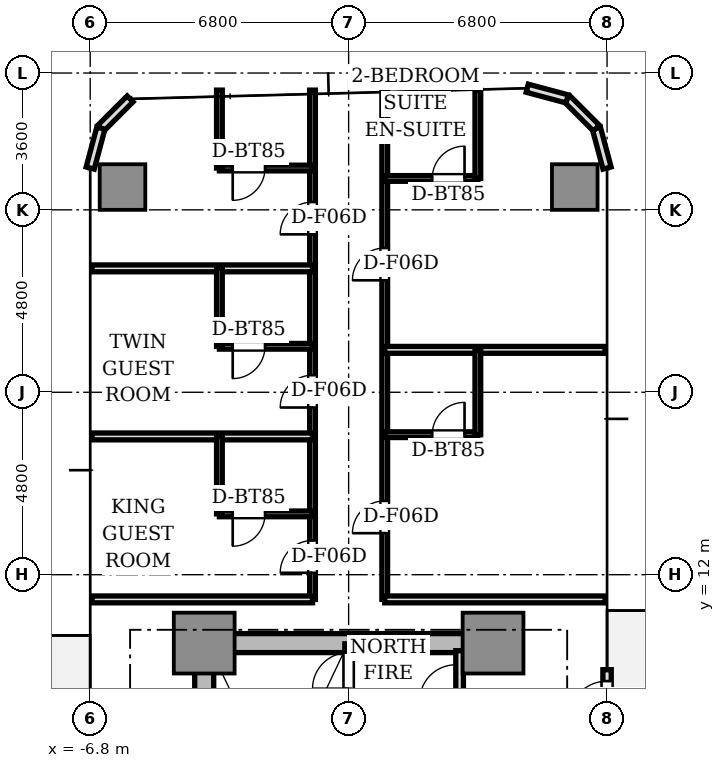
"""IFC4 building model, lengths in metres.
Left out: names, types, materials, properties, quantities, classifications, styles, units other than length and angle.
Written with IfcOpenShell. Run it as: python <this file> out.ifc"""

import sys

from ifc_helpers import new_model, si_unit, direction, frame, frame_2d, origin, origin_2d, place, context, subcontext, project, spatial, rectangle, extrude, source, transform, mapped, element, fill, save


model = new_model("IFC4")
c1 = context("Model", 3, precision=1e-05, world=origin(), true_north=direction((0.0, 1.0)))
c2 = subcontext(c1, "Body", "Model", "MODEL_VIEW")
j1 = project(units=[si_unit("LENGTHUNIT", "METRE"), si_unit("PLANEANGLEUNIT", "RADIAN")], contexts=[c1])
p1 = place(None, origin())
s1 = spatial("IfcSite", under=j1, at=p1, CompositionType="ELEMENT")
p2 = place(p1, origin())
s2 = spatial("IfcBuilding", under=s1, at=p2, CompositionType="ELEMENT")
p3 = place(p2, frame((0.0, 0.0, 36.5)))
s3 = spatial("IfcBuildingStorey", under=s2, at=p3, CompositionType="ELEMENT", Elevation=36.5)
p4 = place(p3, frame((-3.55, 10.2, 0.0), z_axis=(0.0, 0.0, 1.0), x_axis=(1.0, 0.0, 0.0)))
e1 = element("IfcWall", 1, at=p4, inside=s3, PredefinedType="SHEAR", context=c2, shape_type="SweptSolid", body=[
    extrude(rectangle(XDim=7.1, YDim=0.5, at=frame_2d((3.55, 0.0))), origin(), (0.0, 0.0, 1.0), 3.11),
])
p5 = place(p3, frame((-3.8, 2.85, 0.0), z_axis=(0.0, 0.0, 1.0), x_axis=(0.0, 1.0, 0.0)))
e2 = element("IfcWall", 2, at=p5, inside=s3, PredefinedType="SHEAR", context=c2, shape_type="SweptSolid", body=[
    extrude(rectangle(XDim=6.9, YDim=0.5, at=frame_2d((3.45, 0.0))), origin(), (0.0, 0.0, 1.0), 3.11),
])
m1 = source(origin(), c2, "Body", "SweptSolid", [
    extrude(rectangle(XDim=1.6, YDim=1.6, at=origin_2d()), origin(), (0.0, 0.0, 1.0), 3.11),
])
for number, where, z_axis, x_axis in (
    (3, (-3.8, 10.2, 0.0), (0.0, 0.0, 1.0), (1.0, 0.0, 0.0)),
    (4, (3.8, 10.2, 0.0), (0.0, 0.0, 1.0), (1.0, 0.0, 0.0)),
):
    element("IfcColumn", number, at=place(p3, frame(where, z_axis=z_axis, x_axis=x_axis)), inside=s3, PredefinedType="COLUMN", context=c2, shape_type="MappedRepresentation", body=[
        mapped(m1, transform((0.0, 0.0, 0.0), scale=1.0)),
    ])
m2 = source(origin(), c2, "Body", "SweptSolid", [
    extrude(rectangle(XDim=1.2, YDim=1.2, at=origin_2d()), origin(), (0.0, 0.0, 1.0), 3.11),
])
for number, where, z_axis, x_axis in (
    (5, (5.95, 22.2, 0.0), (0.0, 0.0, 1.0), (1.0, 0.0, 0.0)),
    (6, (-5.95, 22.2, 0.0), (0.0, 0.0, 1.0), (1.0, 0.0, 0.0)),
):
    element("IfcColumn", number, at=place(p3, frame(where, z_axis=z_axis, x_axis=x_axis)), inside=s3, PredefinedType="COLUMN", context=c2, shape_type="MappedRepresentation", body=[
        mapped(m2, transform((0.0, 0.0, 0.0), scale=1.0)),
    ])
p6 = place(p3, frame((6.8, 6.8, 0.0), z_axis=(0.0, 0.0, 1.0), x_axis=(0.0, 1.0, 0.0)))
e7 = element("IfcWall", 7, at=p6, inside=s3, PredefinedType="STANDARD", context=c2, shape_type="SweptSolid", body=[
    extrude(rectangle(XDim=2.7, YDim=0.22, at=frame_2d((1.35, 0.0))), origin(), (0.0, 0.0, 1.0), 3.11),
])
p7 = place(p6, frame((1.4, 0.0, 0.0)))
e8 = element("IfcOpeningElement", 8, at=p7, cuts=e7, PredefinedType="OPENING", context=c2, shape_type="SweptSolid", body=[
    extrude(rectangle(XDim=1.0, YDim=2.2, at=frame_2d((0.5, 1.1))), frame((0.0, 0.12, 0.0), z_axis=(0.0, -1.0, 0.0), x_axis=(1.0, 0.0, 0.0)), (0.0, 0.0, 1.0), 0.24),
])
for number, where, z_axis, x_axis in (
    (9, (6.8, 22.7, 0.0), (0.0, 0.0, 1.0), (-0.259, 0.966, 0.0)),
    (10, (6.519, 23.75, 0.0), (0.0, 0.0, 1.0), (-0.707, 0.707, 0.0)),
    (11, (5.75, 24.519, 0.0), (0.0, 0.0, 1.0), (-0.966, 0.259, 0.0)),
    (12, (-5.75, 24.519, 0.0), (0.0, 0.0, 1.0), (-0.707, -0.707, 0.0)),
    (13, (-6.519, 23.75, 0.0), (0.0, 0.0, 1.0), (-0.259, -0.966, 0.0)),
):
    element("IfcWall", number, at=place(p3, frame(where, z_axis=z_axis, x_axis=x_axis)), inside=s3, PredefinedType="STANDARD", context=c2, shape_type="SweptSolid", body=[
        extrude(rectangle(XDim=1.087, YDim=0.22, at=frame_2d((0.543, 0.0))), origin(), (0.0, 0.0, 1.0), 3.11),
    ])
p8 = place(p3, frame((0.0, 2.5, 0.0), z_axis=(0.0, 0.0, 1.0), x_axis=(0.0, 1.0, 0.0)))
e14 = element("IfcWall", 14, at=p8, inside=s3, PredefinedType="SOLIDWALL", context=c2, shape_type="SweptSolid", body=[
    extrude(rectangle(XDim=7.68, YDim=0.2, at=frame_2d((3.84, 0.0))), origin(), (0.0, 0.0, 1.0), 3.11),
])
p9 = place(p8, frame((6.5, 0.0, 0.0)))
e15 = element("IfcOpeningElement", 15, at=p9, cuts=e14, PredefinedType="OPENING", context=c2, shape_type="SweptSolid", body=[
    extrude(rectangle(XDim=0.95, YDim=2.15, at=frame_2d((0.475, 1.075))), frame((0.0, 0.11, 0.0), z_axis=(0.0, -1.0, 0.0), x_axis=(1.0, 0.0, 0.0)), (0.0, 0.0, 1.0), 0.22),
])
p10 = place(p3, frame((2.92, 8.68, 0.0), z_axis=(0.0, 0.0, 1.0), x_axis=(0.0, 1.0, 0.0)))
e16 = element("IfcWall", 16, at=p10, inside=s3, PredefinedType="SOLIDWALL", context=c2, shape_type="SweptSolid", body=[
    extrude(rectangle(XDim=1.32, YDim=0.2, at=frame_2d((0.66, 0.0))), origin(), (0.0, 0.0, 1.0), 2.66),
])
p11 = place(p3, frame((-0.95, 11.35, 0.0), z_axis=(0.0, 0.0, 1.0), x_axis=(0.0, 1.0, 0.0)))
e17 = element("IfcWall", 17, at=p11, inside=s3, PredefinedType="PARTITIONING", context=c2, shape_type="SweptSolid", body=[
    extrude(rectangle(XDim=13.4, YDim=0.15, at=frame_2d((6.7, 0.0))), origin(), (0.0, 0.0, 1.0), 2.66),
])
p12 = place(p11, frame((0.7, 0.0, 0.0)))
e18 = element("IfcOpeningElement", 18, at=p12, cuts=e17, PredefinedType="OPENING", context=c2, shape_type="SweptSolid", body=[
    extrude(rectangle(XDim=0.85, YDim=2.1, at=frame_2d((0.425, 1.05))), frame((0.0, 0.085, 0.0), z_axis=(0.0, -1.0, 0.0), x_axis=(1.0, 0.0, 0.0)), (0.0, 0.0, 1.0), 0.17),
])
p13 = place(p11, frame((5.049, 0.0, 0.0)))
e19 = element("IfcOpeningElement", 19, at=p13, cuts=e17, PredefinedType="OPENING", context=c2, shape_type="SweptSolid", body=[
    extrude(rectangle(XDim=0.85, YDim=2.1, at=frame_2d((0.425, 1.05))), frame((0.0, 0.085, 0.0), z_axis=(0.0, -1.0, 0.0), x_axis=(1.0, 0.0, 0.0)), (0.0, 0.0, 1.0), 0.17),
])
p14 = place(p11, frame((9.605, 0.0, 0.0)))
e20 = element("IfcOpeningElement", 20, at=p14, cuts=e17, PredefinedType="OPENING", context=c2, shape_type="SweptSolid", body=[
    extrude(rectangle(XDim=0.85, YDim=2.1, at=frame_2d((0.425, 1.05))), frame((0.0, 0.085, 0.0), z_axis=(0.0, -1.0, 0.0), x_axis=(1.0, 0.0, 0.0)), (0.0, 0.0, 1.0), 0.17),
])
p15 = place(p3, frame((0.95, 11.35, 0.0), z_axis=(0.0, 0.0, 1.0), x_axis=(0.0, 1.0, 0.0)))
e21 = element("IfcWall", 21, at=p15, inside=s3, PredefinedType="PARTITIONING", context=c2, shape_type="SweptSolid", body=[
    extrude(rectangle(XDim=13.4, YDim=0.15, at=frame_2d((6.7, 0.0))), origin(), (0.0, 0.0, 1.0), 2.66),
])
p16 = place(p15, frame((1.742, 0.0, 0.0)))
e22 = element("IfcOpeningElement", 22, at=p16, cuts=e21, PredefinedType="OPENING", context=c2, shape_type="SweptSolid", body=[
    extrude(rectangle(XDim=0.85, YDim=2.1, at=frame_2d((0.425, 1.05))), frame((0.0, 0.085, 0.0), z_axis=(0.0, -1.0, 0.0), x_axis=(1.0, 0.0, 0.0)), (0.0, 0.0, 1.0), 0.17),
])
p17 = place(p15, frame((8.396, 0.0, 0.0)))
e23 = element("IfcOpeningElement", 23, at=p17, cuts=e21, PredefinedType="OPENING", context=c2, shape_type="SweptSolid", body=[
    extrude(rectangle(XDim=0.85, YDim=2.1, at=frame_2d((0.425, 1.05))), frame((0.0, 0.085, 0.0), z_axis=(0.0, -1.0, 0.0), x_axis=(1.0, 0.0, 0.0)), (0.0, 0.0, 1.0), 0.17),
])
for number, where, z_axis, x_axis in (
    (24, (-0.95, 11.35, 0.0), (0.0, 0.0, 1.0), (-1.0, 0.0, 0.0)),
    (25, (6.75, 11.35, 0.0), (0.0, 0.0, 1.0), (-1.0, 0.0, 0.0)),
    (26, (-0.95, 15.638, 0.0), (0.0, 0.0, 1.0), (-1.0, 0.0, 0.0)),
):
    element("IfcWall", number, at=place(p3, frame(where, z_axis=z_axis, x_axis=x_axis)), inside=s3, PredefinedType="PARTITIONING", context=c2, shape_type="SweptSolid", body=[
        extrude(rectangle(XDim=5.8, YDim=0.18, at=frame_2d((2.9, 0.0))), origin(), (0.0, 0.0, 1.0), 2.66),
    ])
p18 = place(p3, frame((-0.95, 13.6, 0.0), z_axis=(0.0, 0.0, 1.0), x_axis=(-1.0, 0.0, 0.0)))
e27 = element("IfcWall", 27, at=p18, inside=s3, PredefinedType="PARTITIONING", context=c2, shape_type="SweptSolid", body=[
    extrude(rectangle(XDim=2.45, YDim=0.15, at=frame_2d((1.225, 0.0))), origin(), (0.0, 0.0, 1.0), 2.66),
])
p19 = place(p18, frame((1.25, 0.0, 0.0)))
e28 = element("IfcOpeningElement", 28, at=p19, cuts=e27, PredefinedType="OPENING", context=c2, shape_type="SweptSolid", body=[
    extrude(rectangle(XDim=0.85, YDim=2.1, at=frame_2d((0.425, 1.05))), frame((0.0, 0.085, 0.0), z_axis=(0.0, -1.0, 0.0), x_axis=(1.0, 0.0, 0.0)), (0.0, 0.0, 1.0), 0.17),
])
p20 = place(p3, frame((-3.4, 13.6, 0.0), z_axis=(0.0, 0.0, 1.0), x_axis=(0.0, 1.0, 0.0)))
e29 = element("IfcWall", 29, at=p20, inside=s3, PredefinedType="PARTITIONING", context=c2, shape_type="SweptSolid", body=[
    extrude(rectangle(XDim=2.038, YDim=0.15, at=frame_2d((1.019, 0.0))), origin(), (0.0, 0.0, 1.0), 2.66),
])
p21 = place(p3, frame((-0.95, 20.06, 0.0), z_axis=(0.0, 0.0, 1.0), x_axis=(-1.0, 0.0, 0.0)))
e30 = element("IfcWall", 30, at=p21, inside=s3, PredefinedType="PARTITIONING", context=c2, shape_type="SweptSolid", body=[
    extrude(rectangle(XDim=5.8, YDim=0.18, at=frame_2d((2.9, 0.0))), origin(), (0.0, 0.0, 1.0), 2.66),
])
p22 = place(p3, frame((-0.95, 18.01, 0.0), z_axis=(0.0, 0.0, 1.0), x_axis=(-1.0, 0.0, 0.0)))
e31 = element("IfcWall", 31, at=p22, inside=s3, PredefinedType="PARTITIONING", context=c2, shape_type="SweptSolid", body=[
    extrude(rectangle(XDim=2.45, YDim=0.15, at=frame_2d((1.225, 0.0))), origin(), (0.0, 0.0, 1.0), 2.66),
])
p23 = place(p22, frame((1.25, 0.0, 0.0)))
e32 = element("IfcOpeningElement", 32, at=p23, cuts=e31, PredefinedType="OPENING", context=c2, shape_type="SweptSolid", body=[
    extrude(rectangle(XDim=0.85, YDim=2.1, at=frame_2d((0.425, 1.05))), frame((0.0, 0.085, 0.0), z_axis=(0.0, -1.0, 0.0), x_axis=(1.0, 0.0, 0.0)), (0.0, 0.0, 1.0), 0.17),
])
p24 = place(p3, frame((-3.4, 18.01, 0.0), z_axis=(0.0, 0.0, 1.0), x_axis=(0.0, 1.0, 0.0)))
e33 = element("IfcWall", 33, at=p24, inside=s3, PredefinedType="PARTITIONING", context=c2, shape_type="SweptSolid", body=[
    extrude(rectangle(XDim=2.05, YDim=0.15, at=frame_2d((1.025, 0.0))), origin(), (0.0, 0.0, 1.0), 2.66),
])
p25 = place(p3, frame((-0.95, 22.7, 0.0), z_axis=(0.0, 0.0, 1.0), x_axis=(-1.0, 0.0, 0.0)))
e34 = element("IfcWall", 34, at=p25, inside=s3, PredefinedType="PARTITIONING", context=c2, shape_type="SweptSolid", body=[
    extrude(rectangle(XDim=2.45, YDim=0.15, at=frame_2d((1.225, 0.0))), origin(), (0.0, 0.0, 1.0), 2.66),
])
p26 = place(p25, frame((1.25, 0.0, 0.0)))
e35 = element("IfcOpeningElement", 35, at=p26, cuts=e34, PredefinedType="OPENING", context=c2, shape_type="SweptSolid", body=[
    extrude(rectangle(XDim=0.85, YDim=2.1, at=frame_2d((0.425, 1.05))), frame((0.0, 0.085, 0.0), z_axis=(0.0, -1.0, 0.0), x_axis=(1.0, 0.0, 0.0)), (0.0, 0.0, 1.0), 0.17),
])
p27 = place(p3, frame((-3.4, 22.7, 0.0), z_axis=(0.0, 0.0, 1.0), x_axis=(0.0, 1.0, 0.0)))
e36 = element("IfcWall", 36, at=p27, inside=s3, PredefinedType="PARTITIONING", context=c2, shape_type="SweptSolid", body=[
    extrude(rectangle(XDim=2.05, YDim=0.15, at=frame_2d((1.025, 0.0))), origin(), (0.0, 0.0, 1.0), 2.66),
])
p28 = place(p3, frame((0.95, 17.916, 0.0), z_axis=(0.0, 0.0, 1.0), x_axis=(1.0, 0.0, 0.0)))
e37 = element("IfcWall", 37, at=p28, inside=s3, PredefinedType="PARTITIONING", context=c2, shape_type="SweptSolid", body=[
    extrude(rectangle(XDim=5.8, YDim=0.18, at=frame_2d((2.9, 0.0))), origin(), (0.0, 0.0, 1.0), 2.66),
])
p29 = place(p3, frame((0.95, 15.684, 0.0), z_axis=(0.0, 0.0, 1.0), x_axis=(1.0, 0.0, 0.0)))
e38 = element("IfcWall", 38, at=p29, inside=s3, PredefinedType="PARTITIONING", context=c2, shape_type="SweptSolid", body=[
    extrude(rectangle(XDim=2.45, YDim=0.15, at=frame_2d((1.225, 0.0))), origin(), (0.0, 0.0, 1.0), 2.66),
])
p30 = place(p29, frame((1.25, 0.0, 0.0)))
e39 = element("IfcOpeningElement", 39, at=p30, cuts=e38, PredefinedType="OPENING", context=c2, shape_type="SweptSolid", body=[
    extrude(rectangle(XDim=0.85, YDim=2.1, at=frame_2d((0.425, 1.05))), frame((0.0, 0.085, 0.0), z_axis=(0.0, -1.0, 0.0), x_axis=(1.0, 0.0, 0.0)), (0.0, 0.0, 1.0), 0.17),
])
p31 = place(p3, frame((3.4, 15.684, 0.0), z_axis=(0.0, 0.0, 1.0), x_axis=(0.0, 1.0, 0.0)))
e40 = element("IfcWall", 40, at=p31, inside=s3, PredefinedType="PARTITIONING", context=c2, shape_type="SweptSolid", body=[
    extrude(rectangle(XDim=2.232, YDim=0.15, at=frame_2d((1.116, 0.0))), origin(), (0.0, 0.0, 1.0), 2.66),
])
p32 = place(p3, frame((0.95, 22.426, 0.0), z_axis=(0.0, 0.0, 1.0), x_axis=(1.0, 0.0, 0.0)))
e41 = element("IfcWall", 41, at=p32, inside=s3, PredefinedType="PARTITIONING", context=c2, shape_type="SweptSolid", body=[
    extrude(rectangle(XDim=2.45, YDim=0.15, at=frame_2d((1.225, 0.0))), origin(), (0.0, 0.0, 1.0), 2.58),
])
p33 = place(p32, frame((1.25, 0.0, 0.0)))
e42 = element("IfcOpeningElement", 42, at=p33, cuts=e41, PredefinedType="OPENING", context=c2, shape_type="SweptSolid", body=[
    extrude(rectangle(XDim=0.85, YDim=2.1, at=frame_2d((0.425, 1.05))), frame((0.0, 0.085, 0.0), z_axis=(0.0, -1.0, 0.0), x_axis=(1.0, 0.0, 0.0)), (0.0, 0.0, 1.0), 0.17),
])
p34 = place(p3, frame((3.4, 22.426, 0.0), z_axis=(0.0, 0.0, 1.0), x_axis=(0.0, 1.0, 0.0)))
e43 = element("IfcWall", 43, at=p34, inside=s3, PredefinedType="PARTITIONING", context=c2, shape_type="SweptSolid", body=[
    extrude(rectangle(XDim=2.324, YDim=0.15, at=frame_2d((1.162, 0.0))), origin(), (0.0, 0.0, 1.0), 2.66),
])
m3 = source(origin(), c2, "Body", "SweptSolid", [
    extrude(rectangle(XDim=1.0, YDim=0.05, at=origin_2d()), origin(), (0.0, 0.0, 1.0), 2.2),
])
p35 = place(p7, frame((0.5, 0.0, 0.0)))
e44 = element("IfcDoor", 44, at=p35, inside=s3, OperationType="SINGLE_SWING_LEFT", PredefinedType="DOOR", context=c2, shape_type="MappedRepresentation", body=[
    mapped(m3, transform((0.0, 0.0, 0.0), scale=1.0)),
])
fill(e8, e44)
m4 = source(origin(), c2, "Body", "SweptSolid", [
    extrude(rectangle(XDim=0.95, YDim=0.05, at=origin_2d()), origin(), (0.0, 0.0, 1.0), 2.15),
])
p36 = place(p9, frame((0.475, 0.0, 0.0)))
e45 = element("IfcDoor", 45, at=p36, inside=s3, OperationType="SINGLE_SWING_LEFT", PredefinedType="DOOR", context=c2, shape_type="MappedRepresentation", body=[
    mapped(m4, transform((0.0, 0.0, 0.0), scale=1.0)),
])
fill(e15, e45)
m5 = source(origin(), c2, "Body", "SweptSolid", [
    extrude(rectangle(XDim=0.85, YDim=0.05, at=origin_2d()), origin(), (0.0, 0.0, 1.0), 2.1),
])
p37 = place(p19, frame((0.425, 0.0, 0.0)))
e46 = element("IfcDoor", 46, at=p37, inside=s3, OperationType="SINGLE_SWING_RIGHT", PredefinedType="DOOR", context=c2, shape_type="MappedRepresentation", body=[
    mapped(m5, transform((0.0, 0.0, 0.0), scale=1.0)),
])
fill(e28, e46)
p38 = place(p12, frame((0.425, 0.0, 0.0)))
e47 = element("IfcDoor", 47, at=p38, inside=s3, OperationType="SINGLE_SWING_LEFT", PredefinedType="DOOR", context=c2, shape_type="MappedRepresentation", body=[
    mapped(m5, transform((0.0, 0.0, 0.0), scale=1.0)),
])
fill(e18, e47)
p39 = place(p23, frame((0.425, 0.0, 0.0)))
e48 = element("IfcDoor", 48, at=p39, inside=s3, OperationType="SINGLE_SWING_RIGHT", PredefinedType="DOOR", context=c2, shape_type="MappedRepresentation", body=[
    mapped(m5, transform((0.0, 0.0, 0.0), scale=1.0)),
])
fill(e32, e48)
p40 = place(p13, frame((0.425, 0.0, 0.0)))
e49 = element("IfcDoor", 49, at=p40, inside=s3, OperationType="SINGLE_SWING_LEFT", PredefinedType="DOOR", context=c2, shape_type="MappedRepresentation", body=[
    mapped(m5, transform((0.0, 0.0, 0.0), scale=1.0)),
])
fill(e19, e49)
p41 = place(p26, frame((0.425, 0.0, 0.0)))
e50 = element("IfcDoor", 50, at=p41, inside=s3, OperationType="SINGLE_SWING_RIGHT", PredefinedType="DOOR", context=c2, shape_type="MappedRepresentation", body=[
    mapped(m5, transform((0.0, 0.0, 0.0), scale=1.0)),
])
fill(e35, e50)
p42 = place(p14, frame((0.425, 0.0, 0.0)))
e51 = element("IfcDoor", 51, at=p42, inside=s3, OperationType="SINGLE_SWING_LEFT", PredefinedType="DOOR", context=c2, shape_type="MappedRepresentation", body=[
    mapped(m5, transform((0.0, 0.0, 0.0), scale=1.0)),
])
fill(e20, e51)
p43 = place(p30, frame((0.425, 0.0, 0.0)))
e52 = element("IfcDoor", 52, at=p43, inside=s3, OperationType="SINGLE_SWING_RIGHT", PredefinedType="DOOR", context=c2, shape_type="MappedRepresentation", body=[
    mapped(m5, transform((0.0, 0.0, 0.0), scale=1.0)),
])
fill(e39, e52)
p44 = place(p16, frame((0.425, 0.0, 0.0)))
e53 = element("IfcDoor", 53, at=p44, inside=s3, OperationType="SINGLE_SWING_LEFT", PredefinedType="DOOR", context=c2, shape_type="MappedRepresentation", body=[
    mapped(m5, transform((0.0, 0.0, 0.0), scale=1.0)),
])
fill(e22, e53)
p45 = place(p33, frame((0.425, 0.0, 0.0)))
e54 = element("IfcDoor", 54, at=p45, inside=s3, OperationType="SINGLE_SWING_RIGHT", PredefinedType="DOOR", context=c2, shape_type="MappedRepresentation", body=[
    mapped(m5, transform((0.0, 0.0, 0.0), scale=1.0)),
])
fill(e42, e54)
p46 = place(p17, frame((0.425, 0.0, 0.0)))
e55 = element("IfcDoor", 55, at=p46, inside=s3, OperationType="SINGLE_SWING_LEFT", PredefinedType="DOOR", context=c2, shape_type="MappedRepresentation", body=[
    mapped(m5, transform((0.0, 0.0, 0.0), scale=1.0)),
])
fill(e23, e55)
save(model, sys.argv[1])
